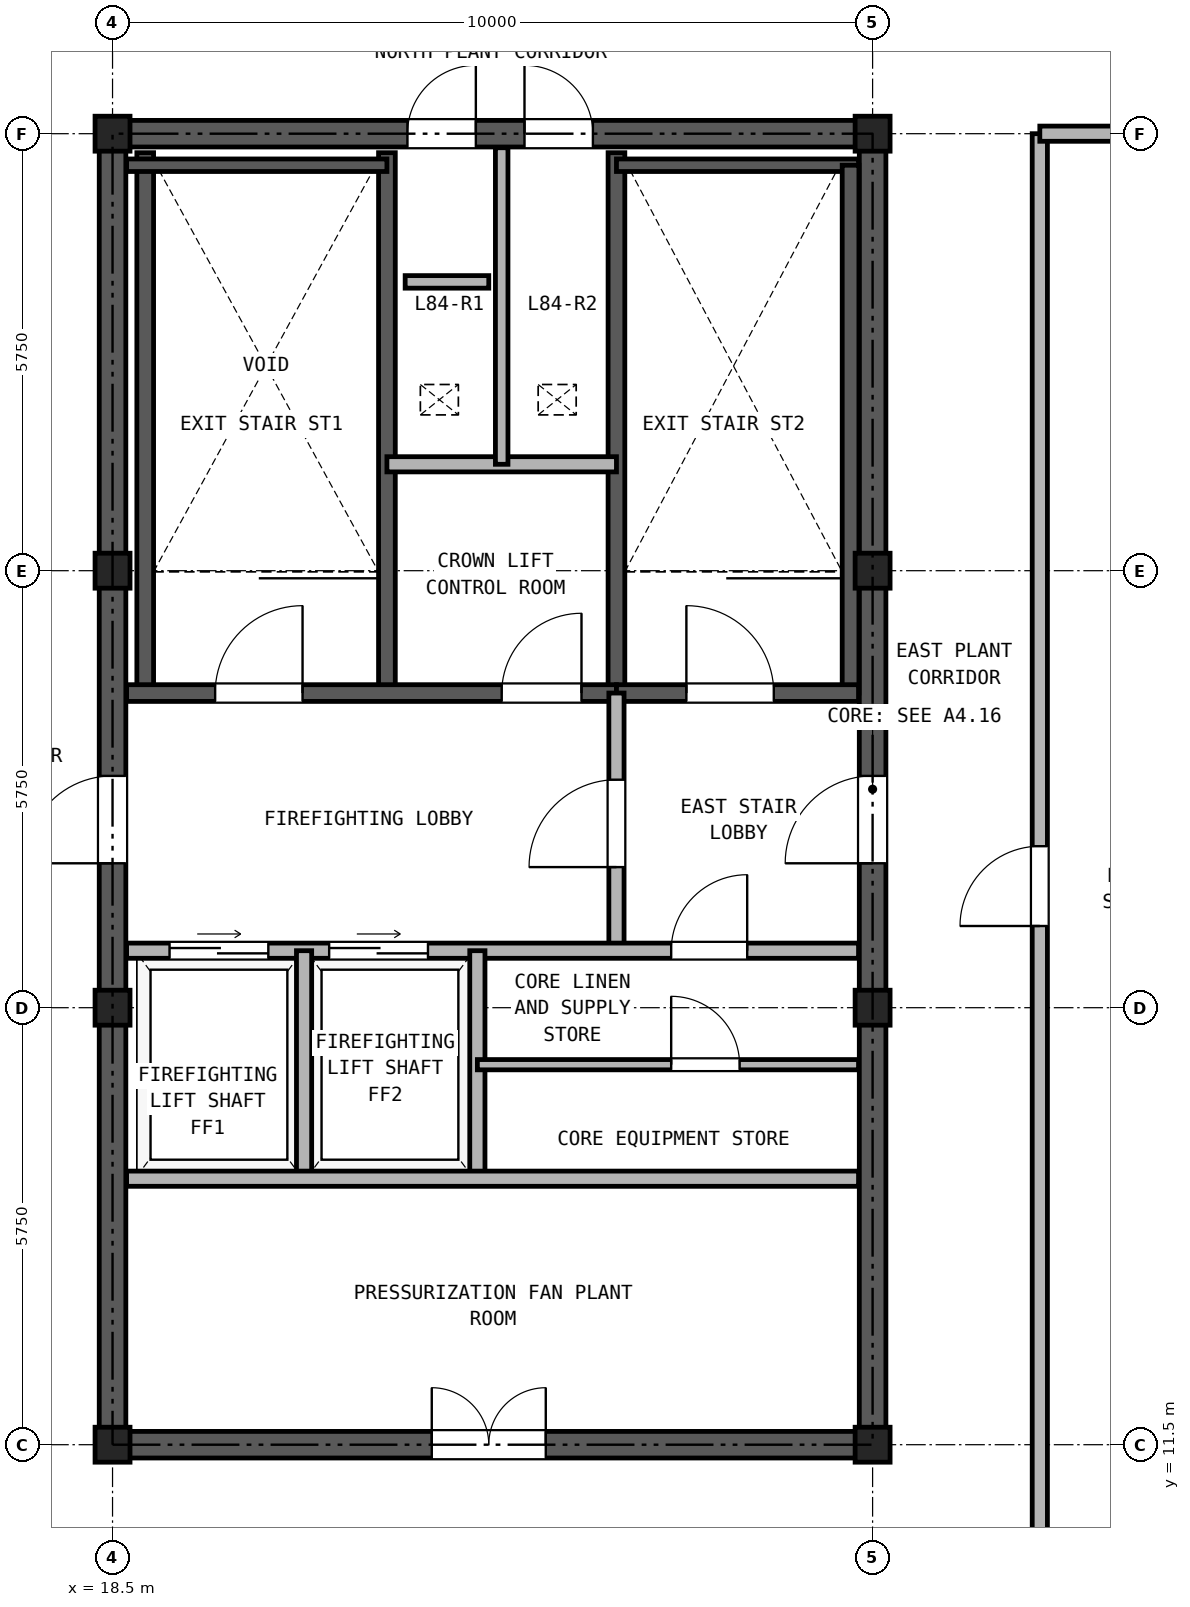
"""IFC4 building model, lengths in metres.
Left out: names, types, materials, properties, quantities, classifications, styles, units other than length and angle.
Written with IfcOpenShell. Run it as: python <this file> out.ifc"""

import sys

from ifc_helpers import new_model, si_unit, direction, frame, frame_2d, origin, origin_2d, place, context, subcontext, project, spatial, rectangle, hollow_rectangle, extrude, source, transform, mapped, element, fill, save


model = new_model("IFC4")
c1 = context("Model", 3, precision=1e-05, world=origin(), true_north=direction((0.0, 1.0)))
c2 = subcontext(c1, "Body", "Model", "MODEL_VIEW")
j1 = project(units=[si_unit("LENGTHUNIT", "METRE"), si_unit("PLANEANGLEUNIT", "RADIAN")], contexts=[c1])
p1 = place(None, origin())
s1 = spatial("IfcSite", under=j1, at=p1, CompositionType="ELEMENT")
p2 = place(p1, origin())
s2 = spatial("IfcBuilding", under=s1, at=p2, CompositionType="ELEMENT")
p3 = place(p2, frame((0.0, 0.0, 292.9)))
s3 = spatial("IfcBuildingStorey", under=s2, at=p3, CompositionType="ELEMENT", Elevation=292.9)
m1 = source(origin(), c2, "Body", "SweptSolid", [
    extrude(hollow_rectangle(XDim=0.46, YDim=0.46, WallThickness=0.025, at=origin_2d()), origin(), (0.0, 0.0, 1.0), 3.312),
])
for number, where, z_axis, x_axis in (
    (1, (18.5, 11.5, 0.0), (0.0, 0.0, 1.0), (1.0, 0.0, 0.0)),
    (2, (18.5, 17.25, 0.0), (0.0, 0.0, 1.0), (1.0, 0.0, 0.0)),
    (3, (18.5, 23.0, 0.0), (0.0, 0.0, 1.0), (1.0, 0.0, 0.0)),
    (4, (18.5, 28.75, 0.0), (0.0, 0.0, 1.0), (1.0, 0.0, 0.0)),
    (5, (28.5, 11.5, 0.0), (0.0, 0.0, 1.0), (1.0, 0.0, 0.0)),
    (6, (28.5, 17.25, 0.0), (0.0, 0.0, 1.0), (1.0, 0.0, 0.0)),
    (7, (28.5, 23.0, 0.0), (0.0, 0.0, 1.0), (1.0, 0.0, 0.0)),
    (8, (28.5, 28.75, 0.0), (0.0, 0.0, 1.0), (1.0, 0.0, 0.0)),
):
    element("IfcColumn", number, at=place(p3, frame(where, z_axis=z_axis, x_axis=x_axis)), inside=s3, PredefinedType="COLUMN", context=c2, shape_type="MappedRepresentation", body=[
        mapped(m1, transform((0.0, 0.0, 0.0), x_axis=(1.0, 0.0, 0.0), y_axis=(0.0, 1.0, 0.0), z_axis=(0.0, 0.0, 1.0), scale=1.0)),
    ])
p4 = place(p3, frame((18.325, 11.5, 0.0), z_axis=(0.0, 0.0, 1.0), x_axis=(1.0, 0.0, 0.0)))
e9 = element("IfcWall", 9, at=p4, inside=s3, PredefinedType="SHEAR", context=c2, shape_type="SweptSolid", body=[
    extrude(rectangle(XDim=10.35, YDim=0.35, at=frame_2d((5.175, 0.0))), origin(), (0.0, 0.0, 1.0), 3.34),
])
p5 = place(p4, frame((4.375, 0.0, 0.0)))
e10 = element("IfcOpeningElement", 10, at=p5, cuts=e9, PredefinedType="OPENING", context=c2, shape_type="SweptSolid", body=[
    extrude(rectangle(XDim=1.5, YDim=2.25, at=frame_2d((0.75, 1.125))), frame((0.0, 0.185, 0.0), z_axis=(0.0, -1.0, 0.0), x_axis=(1.0, 0.0, 0.0)), (0.0, 0.0, 1.0), 0.37),
])
p6 = place(p3, frame((18.325, 28.75, 0.0), z_axis=(0.0, 0.0, 1.0), x_axis=(1.0, 0.0, 0.0)))
e11 = element("IfcWall", 11, at=p6, inside=s3, PredefinedType="SHEAR", context=c2, shape_type="SweptSolid", body=[
    extrude(rectangle(XDim=10.35, YDim=0.35, at=frame_2d((5.175, 0.0))), origin(), (0.0, 0.0, 1.0), 3.34),
])
p7 = place(p6, frame((4.055, 0.0, 0.0)))
e12 = element("IfcOpeningElement", 12, at=p7, cuts=e11, PredefinedType="OPENING", context=c2, shape_type="SweptSolid", body=[
    extrude(rectangle(XDim=0.9, YDim=2.05, at=frame_2d((0.45, 1.025))), frame((0.0, 0.185, 0.0), z_axis=(0.0, -1.0, 0.0), x_axis=(1.0, 0.0, 0.0)), (0.0, 0.0, 1.0), 0.37),
])
p8 = place(p6, frame((5.595, 0.0, 0.0)))
e13 = element("IfcOpeningElement", 13, at=p8, cuts=e11, PredefinedType="OPENING", context=c2, shape_type="SweptSolid", body=[
    extrude(rectangle(XDim=0.9, YDim=2.05, at=frame_2d((0.45, 1.025))), frame((0.0, 0.185, 0.0), z_axis=(0.0, -1.0, 0.0), x_axis=(1.0, 0.0, 0.0)), (0.0, 0.0, 1.0), 0.37),
])
p9 = place(p3, frame((18.5, 11.675, 0.0), z_axis=(0.0, 0.0, 1.0), x_axis=(0.0, 1.0, 0.0)))
e14 = element("IfcWall", 14, at=p9, inside=s3, PredefinedType="SHEAR", context=c2, shape_type="SweptSolid", body=[
    extrude(rectangle(XDim=16.9, YDim=0.35, at=frame_2d((8.45, 0.0))), origin(), (0.0, 0.0, 1.0), 3.34),
])
p10 = place(p9, frame((7.475, 0.0, 0.0)))
e15 = element("IfcOpeningElement", 15, at=p10, cuts=e14, PredefinedType="OPENING", context=c2, shape_type="SweptSolid", body=[
    extrude(rectangle(XDim=1.15, YDim=2.2, at=frame_2d((0.575, 1.1))), frame((0.0, 0.185, 0.0), z_axis=(0.0, -1.0, 0.0), x_axis=(1.0, 0.0, 0.0)), (0.0, 0.0, 1.0), 0.37),
])
p11 = place(p3, frame((28.5, 11.675, 0.0), z_axis=(0.0, 0.0, 1.0), x_axis=(0.0, 1.0, 0.0)))
e16 = element("IfcWall", 16, at=p11, inside=s3, PredefinedType="SHEAR", context=c2, shape_type="SweptSolid", body=[
    extrude(rectangle(XDim=16.9, YDim=0.35, at=frame_2d((8.45, 0.0))), origin(), (0.0, 0.0, 1.0), 3.34),
])
p12 = place(p11, frame((7.475, 0.0, 0.0)))
e17 = element("IfcOpeningElement", 17, at=p12, cuts=e16, PredefinedType="OPENING", context=c2, shape_type="SweptSolid", body=[
    extrude(rectangle(XDim=1.15, YDim=2.2, at=frame_2d((0.575, 1.1))), frame((0.0, 0.185, 0.0), z_axis=(0.0, -1.0, 0.0), x_axis=(1.0, 0.0, 0.0)), (0.0, 0.0, 1.0), 0.37),
])
for number, where, z_axis, x_axis in (
    (18, (18.93, 21.39, 0.0), (0.0, 0.0, 1.0), (0.0, 1.0, 0.0)),
    (19, (22.11, 21.39, 0.0), (0.0, 0.0, 1.0), (0.0, 1.0, 0.0)),
    (20, (25.13, 21.39, 0.0), (0.0, 0.0, 1.0), (0.0, 1.0, 0.0)),
):
    element("IfcWall", number, at=place(p3, frame(where, z_axis=z_axis, x_axis=x_axis)), inside=s3, PredefinedType="SOLIDWALL", context=c2, shape_type="SweptSolid", body=[
        extrude(rectangle(XDim=7.11, YDim=0.22, at=frame_2d((3.555, 0.0))), origin(), (0.0, 0.0, 1.0), 3.34),
    ])
p13 = place(p3, frame((18.685, 28.335, 0.0), z_axis=(0.0, 0.0, 1.0), x_axis=(1.0, 0.0, 0.0)))
e21 = element("IfcWall", 21, at=p13, inside=s3, PredefinedType="PARTITIONING", context=c2, shape_type="SweptSolid", body=[
    extrude(rectangle(XDim=3.425, YDim=0.165, at=frame_2d((1.712, 0.0))), origin(), (0.0, 0.0, 1.0), 3.34),
])
p14 = place(p3, frame((25.13, 28.335, 0.0), z_axis=(0.0, 0.0, 1.0), x_axis=(1.0, 0.0, 0.0)))
e22 = element("IfcWall", 22, at=p14, inside=s3, PredefinedType="PARTITIONING", context=c2, shape_type="SweptSolid", body=[
    extrude(rectangle(XDim=3.185, YDim=0.165, at=frame_2d((1.593, 0.0))), origin(), (0.0, 0.0, 1.0), 3.34),
])
p15 = place(p3, frame((28.21, 21.39, 0.0), z_axis=(0.0, 0.0, 1.0), x_axis=(0.0, 1.0, 0.0)))
e23 = element("IfcWall", 23, at=p15, inside=s3, PredefinedType="SOLIDWALL", context=c2, shape_type="SweptSolid", body=[
    extrude(rectangle(XDim=6.945, YDim=0.22, at=frame_2d((3.473, 0.0))), origin(), (0.0, 0.0, 1.0), 3.34),
])
p16 = place(p3, frame((18.685, 21.39, 0.0), z_axis=(0.0, 0.0, 1.0), x_axis=(1.0, 0.0, 0.0)))
e24 = element("IfcWall", 24, at=p16, inside=s3, PredefinedType="SOLIDWALL", context=c2, shape_type="SweptSolid", body=[
    extrude(rectangle(XDim=6.445, YDim=0.22, at=frame_2d((3.222, 0.0))), origin(), (0.0, 0.0, 1.0), 3.34),
])
p17 = place(p16, frame((1.165, 0.0, 0.0)))
e25 = element("IfcOpeningElement", 25, at=p17, cuts=e24, PredefinedType="OPENING", context=c2, shape_type="SweptSolid", body=[
    extrude(rectangle(XDim=1.15, YDim=2.2, at=frame_2d((0.575, 1.1))), frame((0.0, 0.12, 0.0), z_axis=(0.0, -1.0, 0.0), x_axis=(1.0, 0.0, 0.0)), (0.0, 0.0, 1.0), 0.24),
])
p18 = place(p16, frame((4.935, 0.0, 0.0)))
e26 = element("IfcOpeningElement", 26, at=p18, cuts=e24, PredefinedType="OPENING", context=c2, shape_type="SweptSolid", body=[
    extrude(rectangle(XDim=1.05, YDim=2.15, at=frame_2d((0.525, 1.075))), frame((0.0, 0.12, 0.0), z_axis=(0.0, -1.0, 0.0), x_axis=(1.0, 0.0, 0.0)), (0.0, 0.0, 1.0), 0.24),
])
p19 = place(p3, frame((25.13, 21.39, 0.0), z_axis=(0.0, 0.0, 1.0), x_axis=(1.0, 0.0, 0.0)))
e27 = element("IfcWall", 27, at=p19, inside=s3, PredefinedType="SOLIDWALL", context=c2, shape_type="SweptSolid", body=[
    extrude(rectangle(XDim=3.185, YDim=0.22, at=frame_2d((1.593, 0.0))), origin(), (0.0, 0.0, 1.0), 3.34),
])
p20 = place(p19, frame((0.92, 0.0, 0.0)))
e28 = element("IfcOpeningElement", 28, at=p20, cuts=e27, PredefinedType="OPENING", context=c2, shape_type="SweptSolid", body=[
    extrude(rectangle(XDim=1.15, YDim=2.2, at=frame_2d((0.575, 1.1))), frame((0.0, 0.12, 0.0), z_axis=(0.0, -1.0, 0.0), x_axis=(1.0, 0.0, 0.0)), (0.0, 0.0, 1.0), 0.24),
])
p21 = place(p3, frame((22.11, 24.4, 0.0), z_axis=(0.0, 0.0, 1.0), x_axis=(1.0, 0.0, 0.0)))
e29 = element("IfcWall", 29, at=p21, inside=s3, PredefinedType="PARTITIONING", context=c2, shape_type="SweptSolid", body=[
    extrude(rectangle(XDim=3.02, YDim=0.2, at=frame_2d((1.51, 0.0))), origin(), (0.0, 0.0, 1.0), 3.34),
])
p22 = place(p3, frame((23.62, 24.4, 0.0), z_axis=(0.0, 0.0, 1.0), x_axis=(0.0, 1.0, 0.0)))
e30 = element("IfcWall", 30, at=p22, inside=s3, PredefinedType="PARTITIONING", context=c2, shape_type="SweptSolid", body=[
    extrude(rectangle(XDim=4.165, YDim=0.165, at=frame_2d((2.083, 0.0))), origin(), (0.0, 0.0, 1.0), 3.34),
])
p23 = place(p3, frame((25.13, 18.0, 0.0), z_axis=(0.0, 0.0, 1.0), x_axis=(0.0, 1.0, 0.0)))
e31 = element("IfcWall", 31, at=p23, inside=s3, PredefinedType="PARTITIONING", context=c2, shape_type="SweptSolid", body=[
    extrude(rectangle(XDim=3.39, YDim=0.2, at=frame_2d((1.695, 0.0))), origin(), (0.0, 0.0, 1.0), 3.34),
])
p24 = place(p23, frame((1.1, 0.0, 0.0)))
e32 = element("IfcOpeningElement", 32, at=p24, cuts=e31, PredefinedType="OPENING", context=c2, shape_type="SweptSolid", body=[
    extrude(rectangle(XDim=1.15, YDim=2.2, at=frame_2d((0.575, 1.1))), frame((0.0, 0.11, 0.0), z_axis=(0.0, -1.0, 0.0), x_axis=(1.0, 0.0, 0.0)), (0.0, 0.0, 1.0), 0.22),
])
p25 = place(p3, frame((18.685, 18.0, 0.0), z_axis=(0.0, 0.0, 1.0), x_axis=(1.0, 0.0, 0.0)))
e33 = element("IfcWall", 33, at=p25, inside=s3, PredefinedType="PARTITIONING", context=c2, shape_type="SweptSolid", body=[
    extrude(rectangle(XDim=9.63, YDim=0.2, at=frame_2d((4.815, 0.0))), origin(), (0.0, 0.0, 1.0), 3.34),
])
p26 = place(p25, frame((0.565, 0.0, 0.0)))
e34 = element("IfcOpeningElement", 34, at=p26, cuts=e33, PredefinedType="OPENING", context=c2, shape_type="SweptSolid", body=[
    extrude(rectangle(XDim=1.3, YDim=2.3, at=frame_2d((0.65, 1.15))), frame((0.0, 0.11, 0.0), z_axis=(0.0, -1.0, 0.0), x_axis=(1.0, 0.0, 0.0)), (0.0, 0.0, 1.0), 0.22),
])
p27 = place(p25, frame((2.665, 0.0, 0.0)))
e35 = element("IfcOpeningElement", 35, at=p27, cuts=e33, PredefinedType="OPENING", context=c2, shape_type="SweptSolid", body=[
    extrude(rectangle(XDim=1.3, YDim=2.3, at=frame_2d((0.65, 1.15))), frame((0.0, 0.11, 0.0), z_axis=(0.0, -1.0, 0.0), x_axis=(1.0, 0.0, 0.0)), (0.0, 0.0, 1.0), 0.22),
])
p28 = place(p25, frame((7.165, 0.0, 0.0)))
e36 = element("IfcOpeningElement", 36, at=p28, cuts=e33, PredefinedType="OPENING", context=c2, shape_type="SweptSolid", body=[
    extrude(rectangle(XDim=1.0, YDim=2.15, at=frame_2d((0.5, 1.075))), frame((0.0, 0.11, 0.0), z_axis=(0.0, -1.0, 0.0), x_axis=(1.0, 0.0, 0.0)), (0.0, 0.0, 1.0), 0.22),
])
for number, where, z_axis, x_axis in (
    (37, (21.02, 15.0, 0.0), (0.0, 0.0, 1.0), (0.0, 1.0, 0.0)),
    (38, (23.3, 15.0, 0.0), (0.0, 0.0, 1.0), (0.0, 1.0, 0.0)),
):
    element("IfcWall", number, at=place(p3, frame(where, z_axis=z_axis, x_axis=x_axis)), inside=s3, PredefinedType="PARTITIONING", context=c2, shape_type="SweptSolid", body=[
        extrude(rectangle(XDim=3.0, YDim=0.2, at=frame_2d((1.5, 0.0))), origin(), (0.0, 0.0, 1.0), 3.34),
    ])
p29 = place(p3, frame((18.685, 15.0, 0.0), z_axis=(0.0, 0.0, 1.0), x_axis=(1.0, 0.0, 0.0)))
e39 = element("IfcWall", 39, at=p29, inside=s3, PredefinedType="PARTITIONING", context=c2, shape_type="SweptSolid", body=[
    extrude(rectangle(XDim=9.63, YDim=0.2, at=frame_2d((4.815, 0.0))), origin(), (0.0, 0.0, 1.0), 3.34),
])
p30 = place(p3, frame((23.3, 16.5, 0.0), z_axis=(0.0, 0.0, 1.0), x_axis=(1.0, 0.0, 0.0)))
e40 = element("IfcWall", 40, at=p30, inside=s3, PredefinedType="PARTITIONING", context=c2, shape_type="SweptSolid", body=[
    extrude(rectangle(XDim=5.015, YDim=0.135, at=frame_2d((2.507, 0.0))), origin(), (0.0, 0.0, 1.0), 3.34),
])
p31 = place(p30, frame((2.55, 0.0, 0.0)))
e41 = element("IfcOpeningElement", 41, at=p31, cuts=e40, PredefinedType="OPENING", context=c2, shape_type="SweptSolid", body=[
    extrude(rectangle(XDim=0.9, YDim=2.05, at=frame_2d((0.45, 1.025))), frame((0.0, 0.077, 0.0), z_axis=(0.0, -1.0, 0.0), x_axis=(1.0, 0.0, 0.0)), (0.0, 0.0, 1.0), 0.155),
])
p32 = place(p3, frame((30.7, 8.9, 0.0), z_axis=(0.0, 0.0, 1.0), x_axis=(0.0, 1.0, 0.0)))
e42 = element("IfcWall", 42, at=p32, inside=s3, PredefinedType="PARTITIONING", context=c2, shape_type="SweptSolid", body=[
    extrude(rectangle(XDim=19.85, YDim=0.2, at=frame_2d((9.925, 0.0))), origin(), (0.0, 0.0, 1.0), 3.34),
])
p33 = place(p32, frame((9.425, 0.0, 0.0)))
e43 = element("IfcOpeningElement", 43, at=p33, cuts=e42, PredefinedType="OPENING", context=c2, shape_type="SweptSolid", body=[
    extrude(rectangle(XDim=1.05, YDim=2.15, at=frame_2d((0.525, 1.075))), frame((0.0, 0.11, 0.0), z_axis=(0.0, -1.0, 0.0), x_axis=(1.0, 0.0, 0.0)), (0.0, 0.0, 1.0), 0.22),
])
p34 = place(p3, frame((30.7, 28.75, 0.0), z_axis=(0.0, 0.0, 1.0), x_axis=(1.0, 0.0, 0.0)))
e44 = element("IfcWall", 44, at=p34, inside=s3, PredefinedType="PARTITIONING", context=c2, shape_type="SweptSolid", body=[
    extrude(rectangle(XDim=3.85, YDim=0.2, at=frame_2d((1.925, 0.0))), origin(), (0.0, 0.0, 1.0), 2.865),
])
p35 = place(p3, frame((22.35, 26.8, 0.0), z_axis=(0.0, 0.0, 1.0), x_axis=(1.0, 0.0, 0.0)))
e45 = element("IfcWall", 45, at=p35, inside=s3, PredefinedType="PARTITIONING", context=c2, shape_type="SweptSolid", body=[
    extrude(rectangle(XDim=1.1, YDim=0.165, at=frame_2d((0.55, 0.0))), origin(), (0.0, 0.0, 1.0), 3.34),
])
p36 = place(p17, frame((1.15, 0.0, 0.0), z_axis=(0.0, 0.0, 1.0), x_axis=(-1.0, 0.0, 0.0)))
e46 = element("IfcDoor", 46, at=p36, inside=s3, OperationType="SINGLE_SWING_RIGHT", PredefinedType="DOOR", context=c2, shape_type="SweptSolid", body=[
    extrude(rectangle(XDim=1.15, YDim=2.2, at=frame_2d((0.575, 1.1))), frame((0.0, 0.025, 0.0), z_axis=(0.0, -1.0, 0.0), x_axis=(1.0, 0.0, 0.0)), (0.0, 0.0, 1.0), 0.05),
])
fill(e25, e46)
p37 = place(p20, frame((1.15, 0.0, 0.0), z_axis=(0.0, 0.0, 1.0), x_axis=(-1.0, 0.0, 0.0)))
e47 = element("IfcDoor", 47, at=p37, inside=s3, OperationType="SINGLE_SWING_LEFT", PredefinedType="DOOR", context=c2, shape_type="SweptSolid", body=[
    extrude(rectangle(XDim=1.15, YDim=2.2, at=frame_2d((0.575, 1.1))), frame((0.0, 0.025, 0.0), z_axis=(0.0, -1.0, 0.0), x_axis=(1.0, 0.0, 0.0)), (0.0, 0.0, 1.0), 0.05),
])
fill(e28, e47)
p38 = place(p18, origin())
e48 = element("IfcDoor", 48, at=p38, inside=s3, OperationType="SINGLE_SWING_RIGHT", PredefinedType="DOOR", context=c2, shape_type="SweptSolid", body=[
    extrude(rectangle(XDim=1.05, YDim=2.15, at=frame_2d((0.525, 1.075))), frame((0.0, 0.025, 0.0), z_axis=(0.0, -1.0, 0.0), x_axis=(1.0, 0.0, 0.0)), (0.0, 0.0, 1.0), 0.05),
])
fill(e26, e48)
p39 = place(p24, origin())
e49 = element("IfcDoor", 49, at=p39, inside=s3, OperationType="SINGLE_SWING_LEFT", PredefinedType="DOOR", context=c2, shape_type="SweptSolid", body=[
    extrude(rectangle(XDim=1.15, YDim=2.2, at=frame_2d((0.575, 1.1))), frame((0.0, 0.025, 0.0), z_axis=(0.0, -1.0, 0.0), x_axis=(1.0, 0.0, 0.0)), (0.0, 0.0, 1.0), 0.05),
])
fill(e32, e49)
p40 = place(p26, origin())
e50 = element("IfcDoor", 50, at=p40, inside=s3, OperationType="DOUBLE_DOOR_SLIDING", PredefinedType="DOOR", context=c2, shape_type="SweptSolid", body=[
    extrude(rectangle(XDim=1.3, YDim=2.3, at=frame_2d((0.65, 1.15))), frame((0.0, 0.025, 0.0), z_axis=(0.0, -1.0, 0.0), x_axis=(1.0, 0.0, 0.0)), (0.0, 0.0, 1.0), 0.05),
])
fill(e34, e50)
p41 = place(p27, origin())
e51 = element("IfcDoor", 51, at=p41, inside=s3, OperationType="DOUBLE_DOOR_SLIDING", PredefinedType="DOOR", context=c2, shape_type="SweptSolid", body=[
    extrude(rectangle(XDim=1.3, YDim=2.3, at=frame_2d((0.65, 1.15))), frame((0.0, 0.025, 0.0), z_axis=(0.0, -1.0, 0.0), x_axis=(1.0, 0.0, 0.0)), (0.0, 0.0, 1.0), 0.05),
])
fill(e35, e51)
p42 = place(p28, frame((1.0, 0.0, 0.0), z_axis=(0.0, 0.0, 1.0), x_axis=(-1.0, 0.0, 0.0)))
e52 = element("IfcDoor", 52, at=p42, inside=s3, OperationType="SINGLE_SWING_RIGHT", PredefinedType="DOOR", context=c2, shape_type="SweptSolid", body=[
    extrude(rectangle(XDim=1.0, YDim=2.15, at=frame_2d((0.5, 1.075))), frame((0.0, 0.025, 0.0), z_axis=(0.0, -1.0, 0.0), x_axis=(1.0, 0.0, 0.0)), (0.0, 0.0, 1.0), 0.05),
])
fill(e36, e52)
p43 = place(p31, frame((0.9, 0.0, 0.0), z_axis=(0.0, 0.0, 1.0), x_axis=(-1.0, 0.0, 0.0)))
e53 = element("IfcDoor", 53, at=p43, inside=s3, OperationType="SINGLE_SWING_LEFT", PredefinedType="DOOR", context=c2, shape_type="SweptSolid", body=[
    extrude(rectangle(XDim=0.9, YDim=2.05, at=frame_2d((0.45, 1.025))), frame((0.0, 0.025, 0.0), z_axis=(0.0, -1.0, 0.0), x_axis=(1.0, 0.0, 0.0)), (0.0, 0.0, 1.0), 0.05),
])
fill(e41, e53)
p44 = place(p10, frame((1.15, 0.0, 0.0), z_axis=(0.0, 0.0, 1.0), x_axis=(-1.0, 0.0, 0.0)))
e54 = element("IfcDoor", 54, at=p44, inside=s3, OperationType="SINGLE_SWING_LEFT", PredefinedType="DOOR", context=c2, shape_type="SweptSolid", body=[
    extrude(rectangle(XDim=1.15, YDim=2.2, at=frame_2d((0.575, 1.1))), frame((0.0, 0.025, 0.0), z_axis=(0.0, -1.0, 0.0), x_axis=(1.0, 0.0, 0.0)), (0.0, 0.0, 1.0), 0.05),
])
fill(e15, e54)
p45 = place(p12, origin())
e55 = element("IfcDoor", 55, at=p45, inside=s3, OperationType="SINGLE_SWING_LEFT", PredefinedType="DOOR", context=c2, shape_type="SweptSolid", body=[
    extrude(rectangle(XDim=1.15, YDim=2.2, at=frame_2d((0.575, 1.1))), frame((0.0, 0.025, 0.0), z_axis=(0.0, -1.0, 0.0), x_axis=(1.0, 0.0, 0.0)), (0.0, 0.0, 1.0), 0.05),
])
fill(e17, e55)
p46 = place(p7, origin())
e56 = element("IfcDoor", 56, at=p46, inside=s3, OperationType="SINGLE_SWING_RIGHT", PredefinedType="DOOR", context=c2, shape_type="SweptSolid", body=[
    extrude(rectangle(XDim=0.9, YDim=2.05, at=frame_2d((0.45, 1.025))), frame((0.0, 0.025, 0.0), z_axis=(0.0, -1.0, 0.0), x_axis=(1.0, 0.0, 0.0)), (0.0, 0.0, 1.0), 0.05),
])
fill(e12, e56)
p47 = place(p8, origin())
e57 = element("IfcDoor", 57, at=p47, inside=s3, OperationType="SINGLE_SWING_LEFT", PredefinedType="DOOR", context=c2, shape_type="SweptSolid", body=[
    extrude(rectangle(XDim=0.9, YDim=2.05, at=frame_2d((0.45, 1.025))), frame((0.0, 0.025, 0.0), z_axis=(0.0, -1.0, 0.0), x_axis=(1.0, 0.0, 0.0)), (0.0, 0.0, 1.0), 0.05),
])
fill(e13, e57)
p48 = place(p5, frame((1.5, 0.0, 0.0), z_axis=(0.0, 0.0, 1.0), x_axis=(-1.0, 0.0, 0.0)))
e58 = element("IfcDoor", 58, at=p48, inside=s3, OperationType="DOUBLE_DOOR_SINGLE_SWING", PredefinedType="DOOR", context=c2, shape_type="SweptSolid", body=[
    extrude(rectangle(XDim=1.5, YDim=2.25, at=frame_2d((0.75, 1.125))), frame((0.0, 0.025, 0.0), z_axis=(0.0, -1.0, 0.0), x_axis=(1.0, 0.0, 0.0)), (0.0, 0.0, 1.0), 0.05),
])
fill(e10, e58)
p49 = place(p33, origin())
e59 = element("IfcDoor", 59, at=p49, inside=s3, OperationType="SINGLE_SWING_LEFT", PredefinedType="DOOR", context=c2, shape_type="SweptSolid", body=[
    extrude(rectangle(XDim=1.05, YDim=2.15, at=frame_2d((0.525, 1.075))), frame((0.0, 0.025, 0.0), z_axis=(0.0, -1.0, 0.0), x_axis=(1.0, 0.0, 0.0)), (0.0, 0.0, 1.0), 0.05),
])
fill(e43, e59)
save(model, sys.argv[1])
